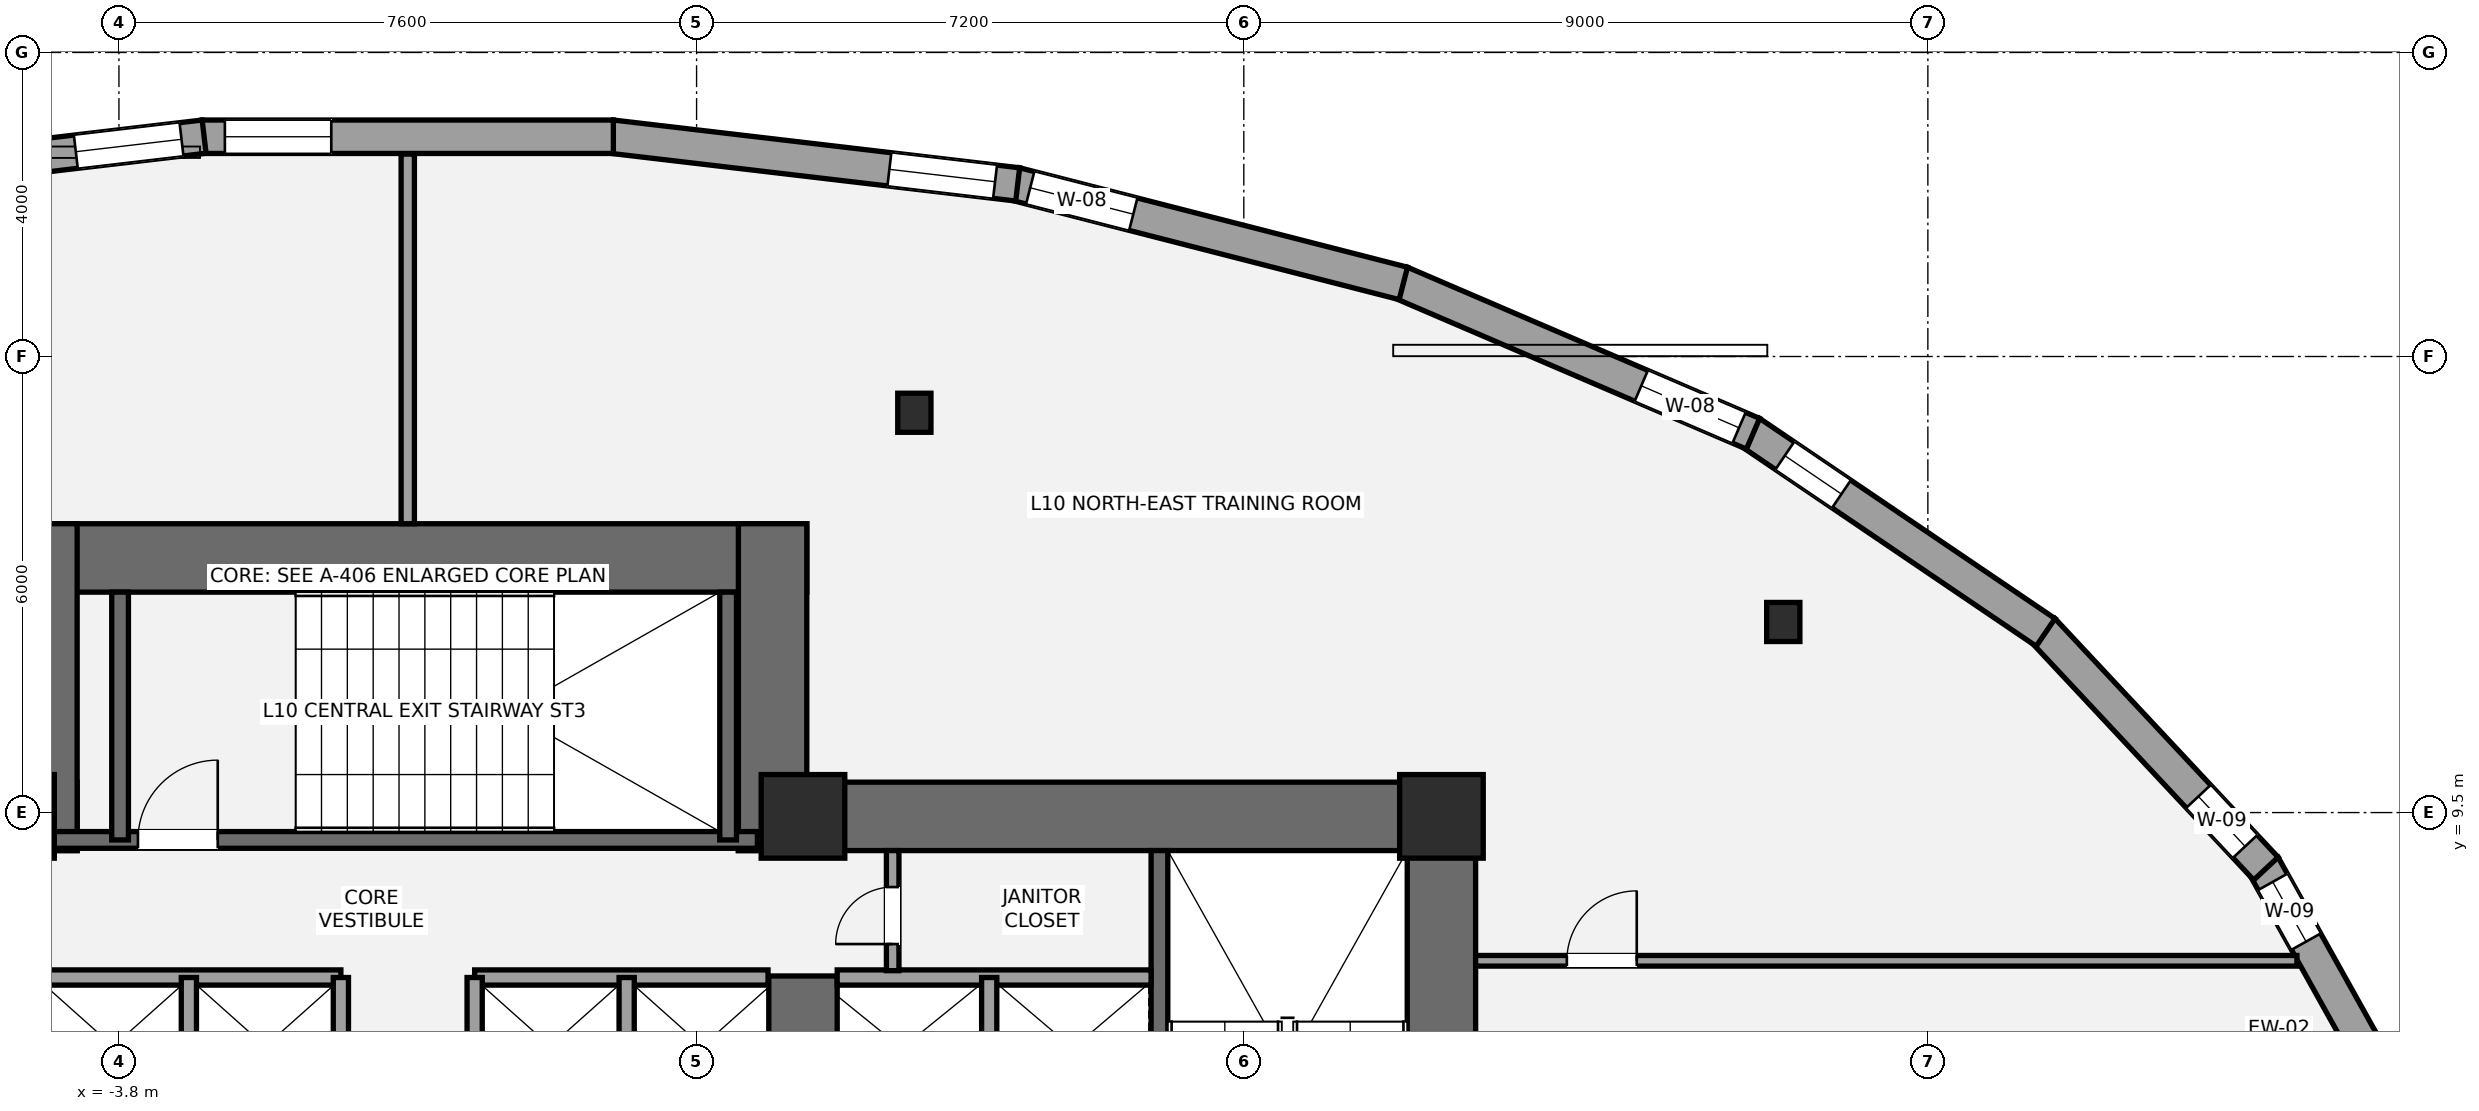
"""IFC4 building model, lengths in metres.
Left out: names, types, materials, properties, quantities, classifications, styles, units other than length and angle.
Written with IfcOpenShell. Run it as: python <this file> out.ifc"""

import sys

from ifc_helpers import new_model, si_unit, direction, frame, frame_2d, origin, origin_2d, place, context, subcontext, project, spatial, rectangle, i_section, extrude, element, fill, save


model = new_model("IFC4")
c1 = context("Model", 3, precision=1e-05, world=origin(), true_north=direction((0.0, 1.0)))
c2 = subcontext(c1, "Body", "Model", "MODEL_VIEW")
j1 = project(units=[si_unit("LENGTHUNIT", "METRE"), si_unit("PLANEANGLEUNIT", "RADIAN")], contexts=[c1])
p1 = place(None, origin())
s1 = spatial("IfcSite", under=j1, at=p1, CompositionType="ELEMENT")
p2 = place(p1, origin())
s2 = spatial("IfcBuilding", under=s1, at=p2, CompositionType="ELEMENT")
p3 = place(p2, frame((0.0, 0.0, 41.4)))
s3 = spatial("IfcBuildingStorey", under=s2, at=p3, CompositionType="ELEMENT", Elevation=41.4)
p4 = place(p3, frame((-14.05, 9.45, 0.0), z_axis=(0.0, 0.0, 1.0), x_axis=(1.0, 0.0, 0.0)))
e1 = element("IfcWall", 1, at=p4, inside=s3, PredefinedType="SHEAR", context=c2, shape_type="SweptSolid", body=[
    extrude(rectangle(XDim=9.7, YDim=0.9, at=frame_2d((4.85, 0.0))), origin(), (0.0, 0.0, 1.0), 3.6),
])
p5 = place(p3, frame((13.6, 0.95, 0.0), z_axis=(0.0, 0.0, 1.0), x_axis=(0.0, 1.0, 0.0)))
e2 = element("IfcWall", 2, at=p5, inside=s3, PredefinedType="SHEAR", context=c2, shape_type="SweptSolid", body=[
    extrude(rectangle(XDim=8.95, YDim=0.9, at=frame_2d((4.475, 0.0))), origin(), (0.0, 0.0, 1.0), 3.6),
])
p6 = place(p3, frame((4.35, 9.45, 0.0), z_axis=(0.0, 0.0, 1.0), x_axis=(1.0, 0.0, 0.0)))
e3 = element("IfcWall", 3, at=p6, inside=s3, PredefinedType="SHEAR", context=c2, shape_type="SweptSolid", body=[
    extrude(rectangle(XDim=9.7, YDim=0.9, at=frame_2d((4.85, 0.0))), origin(), (0.0, 0.0, 1.0), 3.6),
])
p7 = place(p3, frame((5.2, 5.35, 0.0), z_axis=(0.0, 0.0, 1.0), x_axis=(0.0, 1.0, 0.0)))
e4 = element("IfcWall", 4, at=p7, inside=s3, PredefinedType="SHEAR", context=c2, shape_type="SweptSolid", body=[
    extrude(rectangle(XDim=2.0, YDim=0.9, at=frame_2d((1.0, 0.0))), origin(), (0.0, 0.0, 1.0), 3.6),
])
p8 = place(p3, frame((9.89, 1.85, 0.0), z_axis=(0.0, 0.0, 1.0), x_axis=(0.0, 1.0, 0.0)))
e5 = element("IfcWall", 5, at=p8, inside=s3, PredefinedType="SHEAR", context=c2, shape_type="SweptSolid", body=[
    extrude(rectangle(XDim=7.15, YDim=0.22, at=frame_2d((3.575, 0.0))), origin(), (0.0, 0.0, 1.0), 3.6),
])
p9 = place(p3, frame((-5.25, 12.85, 0.0), z_axis=(0.0, 0.0, 1.0), x_axis=(1.0, 0.0, 0.0)))
e6 = element("IfcWall", 6, at=p9, inside=s3, PredefinedType="SHEAR", context=c2, shape_type="SweptSolid", body=[
    extrude(rectangle(XDim=10.5, YDim=0.9, at=frame_2d((5.25, 0.0))), origin(), (0.0, 0.0, 1.0), 3.6),
])
for number, where, z_axis, x_axis in (
    (7, (-4.8, 9.0, 0.0), (0.0, 0.0, 1.0), (0.0, 1.0, 0.0)),
    (8, (4.8, 9.0, 0.0), (0.0, 0.0, 1.0), (0.0, 1.0, 0.0)),
):
    element("IfcWall", number, at=place(p3, frame(where, z_axis=z_axis, x_axis=x_axis)), inside=s3, PredefinedType="SHEAR", context=c2, shape_type="SweptSolid", body=[
        extrude(rectangle(XDim=4.3, YDim=0.9, at=frame_2d((2.15, 0.0))), origin(), (0.0, 0.0, 1.0), 3.6),
    ])
p10 = place(p3, frame((-4.7, 9.14, 0.0), z_axis=(0.0, 0.0, 1.0), x_axis=(1.0, 0.0, 0.0)))
e9 = element("IfcWall", 9, at=p10, inside=s3, PredefinedType="SHEAR", context=c2, shape_type="SweptSolid", body=[
    extrude(rectangle(XDim=9.3, YDim=0.22, at=frame_2d((4.65, 0.0))), origin(), (0.0, 0.0, 1.0), 3.6),
])
p11 = place(p10, frame((1.15, 0.0, 0.0)))
e10 = element("IfcOpeningElement", 10, at=p11, cuts=e9, PredefinedType="OPENING", context=c2, shape_type="SweptSolid", body=[
    extrude(rectangle(XDim=1.05, YDim=2.15, at=frame_2d((0.525, 1.075))), frame((0.0, 0.12, 0.0), z_axis=(0.0, -1.0, 0.0), x_axis=(1.0, 0.0, 0.0)), (0.0, 0.0, 1.0), 0.24),
])
for number, where, z_axis, x_axis in (
    (11, (-3.785, 9.14, 0.0), (0.0, 0.0, 1.0), (0.0, 1.0, 0.0)),
    (12, (4.215, 9.14, 0.0), (0.0, 0.0, 1.0), (0.0, 1.0, 0.0)),
):
    element("IfcWall", number, at=place(p3, frame(where, z_axis=z_axis, x_axis=x_axis)), inside=s3, PredefinedType="SHEAR", context=c2, shape_type="SweptSolid", body=[
        extrude(rectangle(XDim=3.26, YDim=0.22, at=frame_2d((1.63, 0.0))), origin(), (0.0, 0.0, 1.0), 3.6),
    ])
for number, where, z_axis, x_axis in (
    (13, (-5.2, 9.45, 0.0), (0.0, 0.0, 1.0), (1.0, 0.0, 0.0)),
    (14, (5.2, 9.45, 0.0), (0.0, 0.0, 1.0), (1.0, 0.0, 0.0)),
    (15, (13.6, 9.45, 0.0), (0.0, 0.0, 1.0), (1.0, 0.0, 0.0)),
):
    element("IfcColumn", number, at=place(p3, frame(where, z_axis=z_axis, x_axis=x_axis)), inside=s3, PredefinedType="COLUMN", context=c2, shape_type="SweptSolid", body=[
        extrude(rectangle(XDim=1.1, YDim=1.1, at=origin_2d()), origin(), (0.0, 0.0, 1.0), 3.6),
    ])
for number, where, z_axis, x_axis in (
    (16, (18.098, 12.007, 0.0), (0.0, 0.0, 1.0), (1.0, 0.0, 0.0)),
    (17, (6.665, 14.76, 0.0), (0.0, 0.0, 1.0), (1.0, 0.0, 0.0)),
):
    element("IfcColumn", number, at=place(p3, frame(where, z_axis=z_axis, x_axis=x_axis)), inside=s3, PredefinedType="COLUMN", context=c2, shape_type="SweptSolid", body=[
        extrude(i_section(OverallWidth=0.437, OverallDepth=0.514, WebThickness=0.061, FlangeThickness=0.097, at=origin_2d()), origin(), (0.0, 0.0, 1.0), 3.6),
    ])
p12 = place(p3, frame((24.416, 8.806, 0.0), z_axis=(0.0, 0.0, 1.0), x_axis=(0.487369438963, -0.873195871477, 0.0)))
e18 = element("IfcWall", 18, at=p12, inside=s3, PredefinedType="STANDARD", context=c2, shape_type="SweptSolid", body=[
    extrude(rectangle(XDim=3.96, YDim=0.44, at=frame_2d((1.98, 0.0))), origin(), (0.0, 0.0, 1.0), 2.529),
])
p13 = place(p12, frame((0.249, 0.0, 0.58)))
e19 = element("IfcOpeningElement", 19, at=p13, cuts=e18, PredefinedType="OPENING", context=c2, shape_type="SweptSolid", body=[
    extrude(rectangle(XDim=0.9, YDim=1.35, at=frame_2d((0.45, 0.675))), frame((0.0, 0.23, 0.0), z_axis=(0.0, -1.0, 0.0), x_axis=(1.0, 0.0, 0.0)), (0.0, 0.0, 1.0), 0.46),
])
p14 = place(p3, frame((21.512, 11.902, 0.0), z_axis=(0.0, 0.0, 1.0), x_axis=(0.68299392258, -0.730424056093, 0.0)))
e20 = element("IfcWall", 20, at=p14, inside=s3, PredefinedType="STANDARD", context=c2, shape_type="SweptSolid", body=[
    extrude(rectangle(XDim=4.298, YDim=0.44, at=frame_2d((2.149, 0.0))), origin(), (0.0, 0.0, 1.0), 2.529),
])
p15 = place(p14, frame((2.998, 0.0, 0.58)))
e21 = element("IfcOpeningElement", 21, at=p15, cuts=e20, PredefinedType="OPENING", context=c2, shape_type="SweptSolid", body=[
    extrude(rectangle(XDim=0.9, YDim=1.35, at=frame_2d((0.45, 0.675))), frame((0.0, 0.23, 0.0), z_axis=(0.0, -1.0, 0.0), x_axis=(1.0, 0.0, 0.0)), (0.0, 0.0, 1.0), 0.46),
])
p16 = place(p3, frame((17.663, 14.504, 0.0), z_axis=(0.0, 0.0, 1.0), x_axis=(0.827825981515, -0.560984976919, 0.0)))
e22 = element("IfcWall", 22, at=p16, inside=s3, PredefinedType="STANDARD", context=c2, shape_type="SweptSolid", body=[
    extrude(rectangle(XDim=4.695, YDim=0.44, at=frame_2d((2.347, 0.0))), origin(), (0.0, 0.0, 1.0), 2.529),
])
p17 = place(p16, frame((0.549, 0.0, 0.58)))
e23 = element("IfcOpeningElement", 23, at=p17, cuts=e22, PredefinedType="OPENING", context=c2, shape_type="SweptSolid", body=[
    extrude(rectangle(XDim=0.9, YDim=1.35, at=frame_2d((0.45, 0.675))), frame((0.0, 0.23, 0.0), z_axis=(0.0, -1.0, 0.0), x_axis=(1.0, 0.0, 0.0)), (0.0, 0.0, 1.0), 0.46),
])
p18 = place(p3, frame((13.067, 16.473, 0.0), z_axis=(0.0, 0.0, 1.0), x_axis=(0.918881850071, -0.394532819433, 0.0)))
e24 = element("IfcWall", 24, at=p18, inside=s3, PredefinedType="STANDARD", context=c2, shape_type="SweptSolid", body=[
    extrude(rectangle(XDim=5.042, YDim=0.44, at=frame_2d((2.521, 0.0))), origin(), (0.0, 0.0, 1.0), 2.529),
])
p19 = place(p18, frame((3.442, 0.0, 0.45)))
e25 = element("IfcOpeningElement", 25, at=p19, cuts=e24, PredefinedType="OPENING", context=c2, shape_type="SweptSolid", body=[
    extrude(rectangle(XDim=1.4, YDim=1.55, at=frame_2d((0.7, 0.775))), frame((0.0, 0.23, 0.0), z_axis=(0.0, -1.0, 0.0), x_axis=(1.0, 0.0, 0.0)), (0.0, 0.0, 1.0), 0.46),
])
p20 = place(p3, frame((7.996, 17.77, 0.0), z_axis=(0.0, 0.0, 1.0), x_axis=(0.968705592422, -0.248212560542, 0.0)))
e26 = element("IfcWall", 26, at=p20, inside=s3, PredefinedType="STANDARD", context=c2, shape_type="SweptSolid", body=[
    extrude(rectangle(XDim=5.268, YDim=0.44, at=frame_2d((2.634, 0.0))), origin(), (0.0, 0.0, 1.0), 2.529),
])
p21 = place(p20, frame((0.2, 0.0, 0.58)))
e27 = element("IfcOpeningElement", 27, at=p21, cuts=e26, PredefinedType="OPENING", context=c2, shape_type="SweptSolid", body=[
    extrude(rectangle(XDim=1.4, YDim=1.55, at=frame_2d((0.7, 0.775))), frame((0.0, 0.23, 0.0), z_axis=(0.0, -1.0, 0.0), x_axis=(1.0, 0.0, 0.0)), (0.0, 0.0, 1.0), 0.46),
])
p22 = place(p3, frame((2.679, 18.393, 0.0), z_axis=(0.0, 0.0, 1.0), x_axis=(0.993159890371, -0.116762289112, 0.0)))
e28 = element("IfcWall", 28, at=p22, inside=s3, PredefinedType="STANDARD", context=c2, shape_type="SweptSolid", body=[
    extrude(rectangle(XDim=5.382, YDim=0.44, at=frame_2d((2.691, 0.0))), origin(), (0.0, 0.0, 1.0), 2.529),
])
p23 = place(p22, frame((3.682, 0.0, 0.58)))
e29 = element("IfcOpeningElement", 29, at=p23, cuts=e28, PredefinedType="OPENING", context=c2, shape_type="SweptSolid", body=[
    extrude(rectangle(XDim=1.4, YDim=1.55, at=frame_2d((0.7, 0.775))), frame((0.0, 0.23, 0.0), z_axis=(0.0, -1.0, 0.0), x_axis=(1.0, 0.0, 0.0)), (0.0, 0.0, 1.0), 0.46),
])
p24 = place(p3, frame((-2.705, 18.391, 0.0), z_axis=(0.0, 0.0, 1.0), x_axis=(1.0, 0.0, 0.0)))
e30 = element("IfcWall", 30, at=p24, inside=s3, PredefinedType="STANDARD", context=c2, shape_type="SweptSolid", body=[
    extrude(rectangle(XDim=5.41, YDim=0.44, at=frame_2d((2.705, 0.0))), origin(), (0.0, 0.0, 1.0), 2.529),
])
p25 = place(p24, frame((0.299, 0.0, 0.58)))
e31 = element("IfcOpeningElement", 31, at=p25, cuts=e30, PredefinedType="OPENING", context=c2, shape_type="SweptSolid", body=[
    extrude(rectangle(XDim=1.4, YDim=1.55, at=frame_2d((0.7, 0.775))), frame((0.0, 0.23, 0.0), z_axis=(0.0, -1.0, 0.0), x_axis=(1.0, 0.0, 0.0)), (0.0, 0.0, 1.0), 0.46),
])
p26 = place(p3, frame((-8.025, 17.764, 0.0), z_axis=(0.0, 0.0, 1.0), x_axis=(0.993159890371, 0.116762289112, 0.0)))
e32 = element("IfcWall", 32, at=p26, inside=s3, PredefinedType="STANDARD", context=c2, shape_type="SweptSolid", body=[
    extrude(rectangle(XDim=5.382, YDim=0.44, at=frame_2d((2.691, 0.0))), origin(), (0.0, 0.0, 1.0), 2.529),
])
p27 = place(p26, frame((3.682, 0.0, 0.58)))
e33 = element("IfcOpeningElement", 33, at=p27, cuts=e32, PredefinedType="OPENING", context=c2, shape_type="SweptSolid", body=[
    extrude(rectangle(XDim=1.4, YDim=1.55, at=frame_2d((0.7, 0.775))), frame((0.0, 0.23, 0.0), z_axis=(0.0, -1.0, 0.0), x_axis=(1.0, 0.0, 0.0)), (0.0, 0.0, 1.0), 0.46),
])
p28 = place(p3, frame((5.65, 7.33, 0.0), z_axis=(0.0, 0.0, 1.0), x_axis=(1.0, 0.0, 0.0)))
e34 = element("IfcWall", 34, at=p28, inside=s3, PredefinedType="SOLIDWALL", context=c2, shape_type="SweptSolid", body=[
    extrude(rectangle(XDim=4.13, YDim=0.2, at=frame_2d((2.065, 0.0))), origin(), (0.0, 0.0, 1.0), 3.4),
])
p29 = place(p3, frame((7.65, 5.47, 0.0), z_axis=(0.0, 0.0, 1.0), x_axis=(0.0, 1.0, 0.0)))
e35 = element("IfcWall", 35, at=p29, inside=s3, PredefinedType="SOLIDWALL", context=c2, shape_type="SweptSolid", body=[
    extrude(rectangle(XDim=1.86, YDim=0.2, at=frame_2d((0.93, 0.0))), origin(), (0.0, 0.0, 1.0), 3.4),
])
for number, where, z_axis, x_axis in (
    (36, (-4.74, 7.33, 0.0), (0.0, 0.0, 1.0), (1.0, 0.0, 0.0)),
    (37, (0.88, 7.33, 0.0), (0.0, 0.0, 1.0), (1.0, 0.0, 0.0)),
):
    element("IfcWall", number, at=place(p3, frame(where, z_axis=z_axis, x_axis=x_axis)), inside=s3, PredefinedType="SOLIDWALL", context=c2, shape_type="SweptSolid", body=[
        extrude(rectangle(XDim=3.86, YDim=0.2, at=frame_2d((1.93, 0.0))), origin(), (0.0, 0.0, 1.0), 3.4),
    ])
for number, where, z_axis, x_axis in (
    (38, (-2.88, 5.52, 0.0), (0.0, 0.0, 1.0), (0.0, 1.0, 0.0)),
    (39, (2.88, 5.52, 0.0), (0.0, 0.0, 1.0), (0.0, 1.0, 0.0)),
    (40, (-0.88, 5.52, 0.0), (0.0, 0.0, 1.0), (0.0, 1.0, 0.0)),
    (41, (0.88, 5.52, 0.0), (0.0, 0.0, 1.0), (0.0, 1.0, 0.0)),
):
    element("IfcWall", number, at=place(p3, frame(where, z_axis=z_axis, x_axis=x_axis)), inside=s3, PredefinedType="SOLIDWALL", context=c2, shape_type="SweptSolid", body=[
        extrude(rectangle(XDim=1.81, YDim=0.2, at=frame_2d((0.905, 0.0))), origin(), (0.0, 0.0, 1.0), 3.4),
    ])
p30 = place(p3, frame((6.38, 7.42, 0.0), z_axis=(0.0, 0.0, 1.0), x_axis=(0.0, 1.0, 0.0)))
e42 = element("IfcWall", 42, at=p30, inside=s3, PredefinedType="PARTITIONING", context=c2, shape_type="SweptSolid", body=[
    extrude(rectangle(XDim=1.58, YDim=0.165, at=frame_2d((0.79, 0.0))), origin(), (0.0, 0.0, 1.0), 3.4),
])
p31 = place(p30, frame((0.35, 0.0, 0.0)))
e43 = element("IfcOpeningElement", 43, at=p31, cuts=e42, PredefinedType="OPENING", context=c2, shape_type="SweptSolid", body=[
    extrude(rectangle(XDim=0.75, YDim=2.1, at=frame_2d((0.375, 1.05))), frame((0.0, 0.093, 0.0), z_axis=(0.0, -1.0, 0.0), x_axis=(1.0, 0.0, 0.0)), (0.0, 0.0, 1.0), 0.185),
])
p32 = place(p3, frame((14.05, 7.55, 0.0), z_axis=(0.0, 0.0, 1.0), x_axis=(1.0, 0.0, 0.0)))
e44 = element("IfcWall", 44, at=p32, inside=s3, PredefinedType="PARTITIONING", context=c2, shape_type="SweptSolid", body=[
    extrude(rectangle(XDim=10.806, YDim=0.14, at=frame_2d((5.403, 0.0))), origin(), (0.0, 0.0, 1.0), 2.853),
])
p33 = place(p32, frame((1.2, 0.0, 0.0)))
e45 = element("IfcOpeningElement", 45, at=p33, cuts=e44, PredefinedType="OPENING", context=c2, shape_type="SweptSolid", body=[
    extrude(rectangle(XDim=0.92, YDim=2.15, at=frame_2d((0.46, 1.075))), frame((0.0, 0.08, 0.0), z_axis=(0.0, -1.0, 0.0), x_axis=(1.0, 0.0, 0.0)), (0.0, 0.0, 1.0), 0.16),
])
p34 = place(p3, frame((0.0, 13.3, 0.0), z_axis=(0.0, 0.0, 1.0), x_axis=(0.0, 1.0, 0.0)))
e46 = element("IfcWall", 46, at=p34, inside=s3, PredefinedType="PARTITIONING", context=c2, shape_type="SweptSolid", body=[
    extrude(rectangle(XDim=4.863, YDim=0.175, at=frame_2d((2.432, 0.0))), origin(), (0.0, 0.0, 1.0), 3.4),
])
p35 = place(p13, origin())
e47 = element("IfcWindow", 47, at=p35, inside=s3, PartitioningType="SINGLE_PANEL", PredefinedType="WINDOW", context=c2, shape_type="SweptSolid", body=[
    extrude(rectangle(XDim=0.9, YDim=1.35, at=frame_2d((0.45, 0.675))), frame((0.0, -0.01, 0.0), z_axis=(0.0, -1.0, 0.0), x_axis=(1.0, 0.0, 0.0)), (0.0, 0.0, 1.0), 0.06),
])
fill(e19, e47)
p36 = place(p15, origin())
e48 = element("IfcWindow", 48, at=p36, inside=s3, PartitioningType="SINGLE_PANEL", PredefinedType="WINDOW", context=c2, shape_type="SweptSolid", body=[
    extrude(rectangle(XDim=0.9, YDim=1.35, at=frame_2d((0.45, 0.675))), frame((0.0, -0.01, 0.0), z_axis=(0.0, -1.0, 0.0), x_axis=(1.0, 0.0, 0.0)), (0.0, 0.0, 1.0), 0.06),
])
fill(e21, e48)
p37 = place(p17, origin())
e49 = element("IfcWindow", 49, at=p37, inside=s3, PartitioningType="SINGLE_PANEL", PredefinedType="WINDOW", context=c2, shape_type="SweptSolid", body=[
    extrude(rectangle(XDim=0.9, YDim=1.35, at=frame_2d((0.45, 0.675))), frame((0.0, -0.01, 0.0), z_axis=(0.0, -1.0, 0.0), x_axis=(1.0, 0.0, 0.0)), (0.0, 0.0, 1.0), 0.06),
])
fill(e23, e49)
p38 = place(p19, origin())
e50 = element("IfcWindow", 50, at=p38, inside=s3, PartitioningType="SINGLE_PANEL", PredefinedType="WINDOW", context=c2, shape_type="SweptSolid", body=[
    extrude(rectangle(XDim=1.4, YDim=1.55, at=frame_2d((0.7, 0.775))), frame((0.0, -0.01, 0.0), z_axis=(0.0, -1.0, 0.0), x_axis=(1.0, 0.0, 0.0)), (0.0, 0.0, 1.0), 0.06),
])
fill(e25, e50)
p39 = place(p21, origin())
e51 = element("IfcWindow", 51, at=p39, inside=s3, PartitioningType="SINGLE_PANEL", PredefinedType="WINDOW", context=c2, shape_type="SweptSolid", body=[
    extrude(rectangle(XDim=1.4, YDim=1.55, at=frame_2d((0.7, 0.775))), frame((0.0, -0.01, 0.0), z_axis=(0.0, -1.0, 0.0), x_axis=(1.0, 0.0, 0.0)), (0.0, 0.0, 1.0), 0.06),
])
fill(e27, e51)
p40 = place(p23, origin())
e52 = element("IfcWindow", 52, at=p40, inside=s3, PartitioningType="SINGLE_PANEL", PredefinedType="WINDOW", context=c2, shape_type="SweptSolid", body=[
    extrude(rectangle(XDim=1.4, YDim=1.55, at=frame_2d((0.7, 0.775))), frame((0.0, -0.01, 0.0), z_axis=(0.0, -1.0, 0.0), x_axis=(1.0, 0.0, 0.0)), (0.0, 0.0, 1.0), 0.06),
])
fill(e29, e52)
p41 = place(p25, origin())
e53 = element("IfcWindow", 53, at=p41, inside=s3, PartitioningType="SINGLE_PANEL", PredefinedType="WINDOW", context=c2, shape_type="SweptSolid", body=[
    extrude(rectangle(XDim=1.4, YDim=1.55, at=frame_2d((0.7, 0.775))), frame((0.0, -0.01, 0.0), z_axis=(0.0, -1.0, 0.0), x_axis=(1.0, 0.0, 0.0)), (0.0, 0.0, 1.0), 0.06),
])
fill(e31, e53)
p42 = place(p27, origin())
e54 = element("IfcWindow", 54, at=p42, inside=s3, PartitioningType="SINGLE_PANEL", PredefinedType="WINDOW", context=c2, shape_type="SweptSolid", body=[
    extrude(rectangle(XDim=1.4, YDim=1.55, at=frame_2d((0.7, 0.775))), frame((0.0, -0.01, 0.0), z_axis=(0.0, -1.0, 0.0), x_axis=(1.0, 0.0, 0.0)), (0.0, 0.0, 1.0), 0.06),
])
fill(e33, e54)
p43 = place(p11, origin())
e55 = element("IfcDoor", 55, at=p43, inside=s3, OperationType="SINGLE_SWING_RIGHT", PredefinedType="DOOR", context=c2, shape_type="SweptSolid", body=[
    extrude(rectangle(XDim=1.05, YDim=2.15, at=frame_2d((0.525, 1.075))), frame((0.0, 0.025, 0.0), z_axis=(0.0, -1.0, 0.0), x_axis=(1.0, 0.0, 0.0)), (0.0, 0.0, 1.0), 0.05),
])
fill(e10, e55)
p44 = place(p31, origin())
e56 = element("IfcDoor", 56, at=p44, inside=s3, OperationType="SINGLE_SWING_LEFT", PredefinedType="DOOR", context=c2, shape_type="SweptSolid", body=[
    extrude(rectangle(XDim=0.75, YDim=2.1, at=frame_2d((0.375, 1.05))), frame((0.0, 0.025, 0.0), z_axis=(0.0, -1.0, 0.0), x_axis=(1.0, 0.0, 0.0)), (0.0, 0.0, 1.0), 0.05),
])
fill(e43, e56)
p45 = place(p33, origin())
e57 = element("IfcDoor", 57, at=p45, inside=s3, OperationType="SINGLE_SWING_RIGHT", PredefinedType="DOOR", context=c2, shape_type="SweptSolid", body=[
    extrude(rectangle(XDim=0.92, YDim=2.15, at=frame_2d((0.46, 1.075))), frame((0.0, 0.025, 0.0), z_axis=(0.0, -1.0, 0.0), x_axis=(1.0, 0.0, 0.0)), (0.0, 0.0, 1.0), 0.05),
])
fill(e45, e57)
save(model, sys.argv[1])
